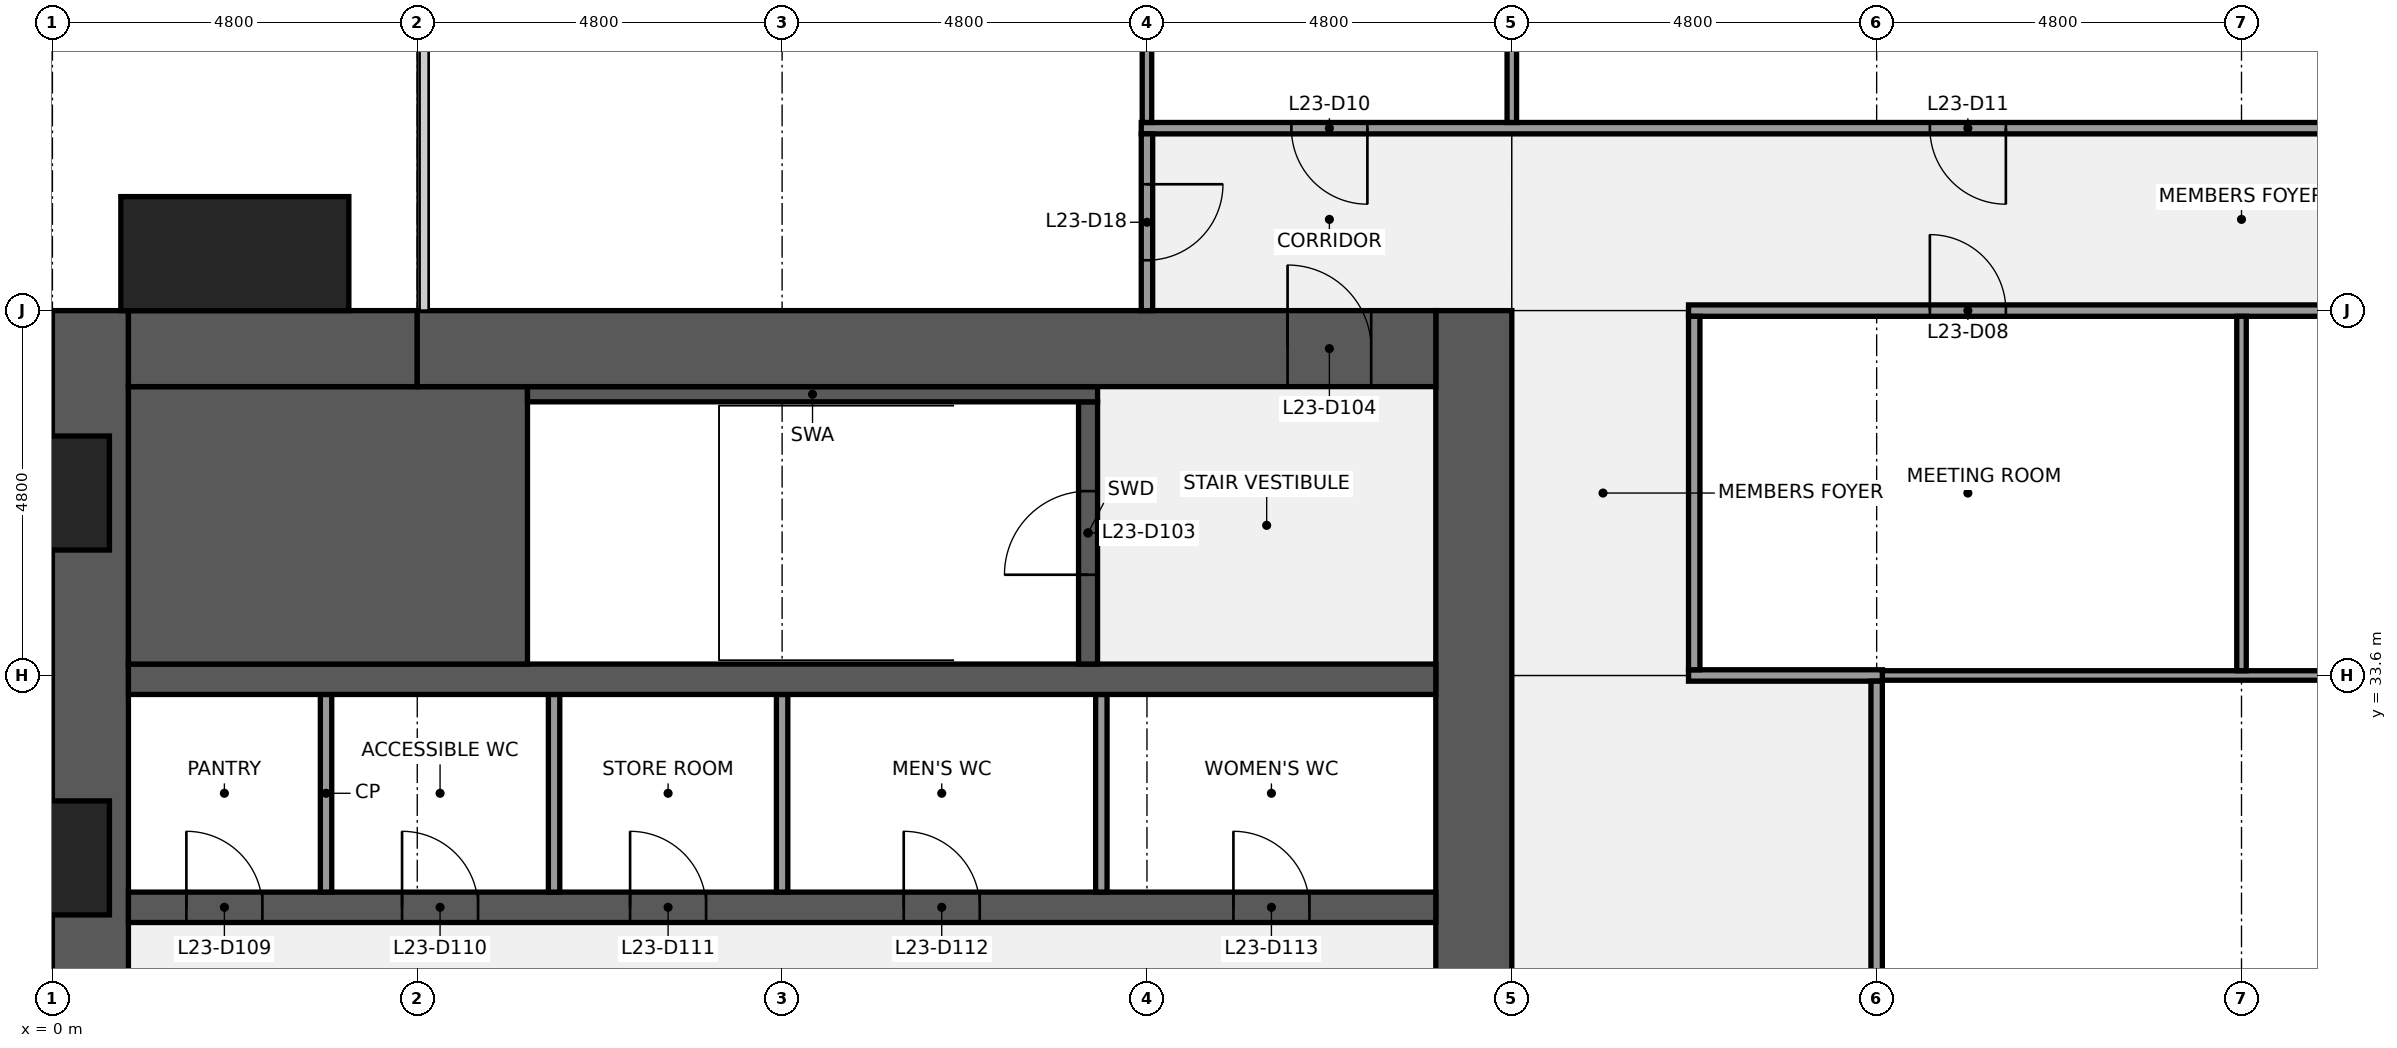
"""IFC4 building model, lengths in metres.
Left out: names, types, materials, properties, quantities, classifications, styles, units other than length and angle.
Written with IfcOpenShell. Run it as: python <this file> out.ifc"""

import sys

from ifc_helpers import new_model, si_unit, direction, frame, frame_2d, origin, origin_2d, place, context, subcontext, project, spatial, rectangle, extrude, element, fill, save


model = new_model("IFC4")
c1 = context("Model", 3, precision=1e-05, world=origin(), true_north=direction((0.0, 1.0)))
c2 = subcontext(c1, "Body", "Model", "MODEL_VIEW")
j1 = project(units=[si_unit("LENGTHUNIT", "METRE"), si_unit("PLANEANGLEUNIT", "RADIAN")], contexts=[c1])
p1 = place(None, origin())
s1 = spatial("IfcSite", under=j1, at=p1, CompositionType="ELEMENT")
p2 = place(p1, origin())
s2 = spatial("IfcBuilding", under=s1, at=p2, CompositionType="ELEMENT")
p3 = place(p2, frame((0.0, 0.0, 112.1)))
s3 = spatial("IfcBuildingStorey", under=s2, at=p3, CompositionType="ELEMENT", Elevation=112.1)
p4 = place(p3, frame((0.5, 9.6, 0.0), z_axis=(0.0, 0.0, 1.0), x_axis=(0.0, 1.0, 0.0)))
e1 = element("IfcWall", 1, at=p4, inside=s3, PredefinedType="SHEAR", context=c2, shape_type="SweptSolid", body=[
    extrude(rectangle(XDim=28.8, YDim=1.0, at=frame_2d((14.4, 0.0))), origin(), (0.0, 0.0, 1.0), 3.84),
])
p5 = place(p4, frame((8.85, 0.0, 0.9)))
e2 = element("IfcOpeningElement", 2, at=p5, cuts=e1, PredefinedType="OPENING", context=c2, shape_type="SweptSolid", body=[
    extrude(rectangle(XDim=1.5, YDim=1.5, at=frame_2d((0.75, 0.75))), frame((0.0, 0.51, 0.0), z_axis=(0.0, -1.0, 0.0), x_axis=(1.0, 0.0, 0.0)), (0.0, 0.0, 1.0), 1.02),
])
p6 = place(p4, frame((18.45, 0.0, 0.9)))
e3 = element("IfcOpeningElement", 3, at=p6, cuts=e1, PredefinedType="OPENING", context=c2, shape_type="SweptSolid", body=[
    extrude(rectangle(XDim=1.5, YDim=1.5, at=frame_2d((0.75, 0.75))), frame((0.0, 0.51, 0.0), z_axis=(0.0, -1.0, 0.0), x_axis=(1.0, 0.0, 0.0)), (0.0, 0.0, 1.0), 1.02),
])
p7 = place(p3, frame((18.7, 38.4, 0.0), z_axis=(0.0, 0.0, 1.0), x_axis=(0.0, -1.0, 0.0)))
e4 = element("IfcWall", 4, at=p7, inside=s3, PredefinedType="SHEAR", context=c2, shape_type="SweptSolid", body=[
    extrude(rectangle(XDim=28.8, YDim=1.0, at=frame_2d((14.4, 0.0))), origin(), (0.0, 0.0, 1.0), 3.84),
])
p8 = place(p7, frame((18.3, 0.0, 0.0)))
e5 = element("IfcOpeningElement", 5, at=p8, cuts=e4, PredefinedType="OPENING", context=c2, shape_type="SweptSolid", body=[
    extrude(rectangle(XDim=1.8, YDim=2.1, at=frame_2d((0.9, 1.05))), frame((0.0, 0.51, 0.0), z_axis=(0.0, -1.0, 0.0), x_axis=(1.0, 0.0, 0.0)), (0.0, 0.0, 1.0), 1.02),
])
p9 = place(p7, frame((8.7, 0.0, 0.0)))
e6 = element("IfcOpeningElement", 6, at=p9, cuts=e4, PredefinedType="OPENING", context=c2, shape_type="SweptSolid", body=[
    extrude(rectangle(XDim=1.8, YDim=2.1, at=frame_2d((0.9, 1.05))), frame((0.0, 0.51, 0.0), z_axis=(0.0, -1.0, 0.0), x_axis=(1.0, 0.0, 0.0)), (0.0, 0.0, 1.0), 1.02),
])
p10 = place(p3, frame((1.0, 30.55, 0.0), z_axis=(0.0, 0.0, 1.0), x_axis=(1.0, 0.0, 0.0)))
e7 = element("IfcWall", 7, at=p10, inside=s3, PredefinedType="SHEAR", context=c2, shape_type="SweptSolid", body=[
    extrude(rectangle(XDim=17.2, YDim=0.4, at=frame_2d((8.6, 0.0))), origin(), (0.0, 0.0, 1.0), 3.84),
])
p11 = place(p10, frame((0.762, 0.0, 0.0)))
e8 = element("IfcOpeningElement", 8, at=p11, cuts=e7, PredefinedType="OPENING", context=c2, shape_type="SweptSolid", body=[
    extrude(rectangle(XDim=1.0, YDim=2.1, at=frame_2d((0.5, 1.05))), frame((0.0, 0.21, 0.0), z_axis=(0.0, -1.0, 0.0), x_axis=(1.0, 0.0, 0.0)), (0.0, 0.0, 1.0), 0.42),
])
p12 = place(p10, frame((3.6, 0.0, 0.0)))
e9 = element("IfcOpeningElement", 9, at=p12, cuts=e7, PredefinedType="OPENING", context=c2, shape_type="SweptSolid", body=[
    extrude(rectangle(XDim=1.0, YDim=2.1, at=frame_2d((0.5, 1.05))), frame((0.0, 0.21, 0.0), z_axis=(0.0, -1.0, 0.0), x_axis=(1.0, 0.0, 0.0)), (0.0, 0.0, 1.0), 0.42),
])
p13 = place(p10, frame((6.6, 0.0, 0.0)))
e10 = element("IfcOpeningElement", 10, at=p13, cuts=e7, PredefinedType="OPENING", context=c2, shape_type="SweptSolid", body=[
    extrude(rectangle(XDim=1.0, YDim=2.1, at=frame_2d((0.5, 1.05))), frame((0.0, 0.21, 0.0), z_axis=(0.0, -1.0, 0.0), x_axis=(1.0, 0.0, 0.0)), (0.0, 0.0, 1.0), 0.42),
])
p14 = place(p10, frame((10.2, 0.0, 0.0)))
e11 = element("IfcOpeningElement", 11, at=p14, cuts=e7, PredefinedType="OPENING", context=c2, shape_type="SweptSolid", body=[
    extrude(rectangle(XDim=1.0, YDim=2.1, at=frame_2d((0.5, 1.05))), frame((0.0, 0.21, 0.0), z_axis=(0.0, -1.0, 0.0), x_axis=(1.0, 0.0, 0.0)), (0.0, 0.0, 1.0), 0.42),
])
p15 = place(p10, frame((14.538, 0.0, 0.0)))
e12 = element("IfcOpeningElement", 12, at=p15, cuts=e7, PredefinedType="OPENING", context=c2, shape_type="SweptSolid", body=[
    extrude(rectangle(XDim=1.0, YDim=2.1, at=frame_2d((0.5, 1.05))), frame((0.0, 0.21, 0.0), z_axis=(0.0, -1.0, 0.0), x_axis=(1.0, 0.0, 0.0)), (0.0, 0.0, 1.0), 0.42),
])
for number, where, z_axis, x_axis in (
    (13, (3.6, 30.75, 0.0), (0.0, 0.0, 1.0), (0.0, 1.0, 0.0)),
    (14, (6.6, 30.75, 0.0), (0.0, 0.0, 1.0), (0.0, 1.0, 0.0)),
    (15, (9.6, 30.75, 0.0), (0.0, 0.0, 1.0), (0.0, 1.0, 0.0)),
    (16, (13.8, 30.75, 0.0), (0.0, 0.0, 1.0), (0.0, 1.0, 0.0)),
):
    element("IfcWall", number, at=place(p3, frame(where, z_axis=z_axis, x_axis=x_axis)), inside=s3, PredefinedType="PARTITIONING", context=c2, shape_type="SweptSolid", body=[
        extrude(rectangle(XDim=2.6, YDim=0.15, at=frame_2d((1.3, 0.0))), origin(), (0.0, 0.0, 1.0), 3.84),
    ])
p16 = place(p3, frame((1.0, 33.55, 0.0), z_axis=(0.0, 0.0, 1.0), x_axis=(1.0, 0.0, 0.0)))
e17 = element("IfcWall", 17, at=p16, inside=s3, PredefinedType="SHEAR", context=c2, shape_type="SweptSolid", body=[
    extrude(rectangle(XDim=17.2, YDim=0.4, at=frame_2d((8.6, 0.0))), origin(), (0.0, 0.0, 1.0), 3.84),
])
p17 = place(p3, frame((1.0, 35.575, 0.0), z_axis=(0.0, 0.0, 1.0), x_axis=(1.0, 0.0, 0.0)))
e18 = element("IfcWall", 18, at=p17, inside=s3, PredefinedType="SHEAR", context=c2, shape_type="SweptSolid", body=[
    extrude(rectangle(XDim=5.25, YDim=3.65, at=frame_2d((2.625, 0.0))), origin(), (0.0, 0.0, 1.0), 3.84),
])
p18 = place(p3, frame((13.625, 33.75, 0.0), z_axis=(0.0, 0.0, 1.0), x_axis=(0.0, 1.0, 0.0)))
e19 = element("IfcWall", 19, at=p18, inside=s3, PredefinedType="SHEAR", context=c2, shape_type="SweptSolid", body=[
    extrude(rectangle(XDim=3.45, YDim=0.25, at=frame_2d((1.725, 0.0))), origin(), (0.0, 0.0, 1.0), 3.84),
])
p19 = place(p18, frame((1.175, 0.0, 0.0)))
e20 = element("IfcOpeningElement", 20, at=p19, cuts=e19, PredefinedType="OPENING", context=c2, shape_type="SweptSolid", body=[
    extrude(rectangle(XDim=1.1, YDim=2.1, at=frame_2d((0.55, 1.05))), frame((0.0, 0.135, 0.0), z_axis=(0.0, -1.0, 0.0), x_axis=(1.0, 0.0, 0.0)), (0.0, 0.0, 1.0), 0.27),
])
p20 = place(p3, frame((6.25, 37.3, 0.0), z_axis=(0.0, 0.0, 1.0), x_axis=(1.0, 0.0, 0.0)))
e21 = element("IfcWall", 21, at=p20, inside=s3, PredefinedType="SHEAR", context=c2, shape_type="SweptSolid", body=[
    extrude(rectangle(XDim=7.5, YDim=0.2, at=frame_2d((3.75, 0.0))), origin(), (0.0, 0.0, 1.0), 3.84),
])
p21 = place(p3, frame((1.0, 37.9, 0.0), z_axis=(0.0, 0.0, 1.0), x_axis=(1.0, 0.0, 0.0)))
e22 = element("IfcWall", 22, at=p21, inside=s3, PredefinedType="SHEAR", context=c2, shape_type="SweptSolid", body=[
    extrude(rectangle(XDim=3.8, YDim=1.0, at=frame_2d((1.9, 0.0))), origin(), (0.0, 0.0, 1.0), 3.84),
])
p22 = place(p3, frame((4.8, 37.9, 0.0), z_axis=(0.0, 0.0, 1.0), x_axis=(1.0, 0.0, 0.0)))
e23 = element("IfcWall", 23, at=p22, inside=s3, PredefinedType="SHEAR", context=c2, shape_type="SweptSolid", body=[
    extrude(rectangle(XDim=13.4, YDim=1.0, at=frame_2d((6.7, 0.0))), origin(), (0.0, 0.0, 1.0), 3.84),
])
p23 = place(p22, frame((11.45, 0.0, 0.0)))
e24 = element("IfcOpeningElement", 24, at=p23, cuts=e23, PredefinedType="OPENING", context=c2, shape_type="SweptSolid", body=[
    extrude(rectangle(XDim=1.1, YDim=2.1, at=frame_2d((0.55, 1.05))), frame((0.0, 0.51, 0.0), z_axis=(0.0, -1.0, 0.0), x_axis=(1.0, 0.0, 0.0)), (0.0, 0.0, 1.0), 1.02),
])
p24 = place(p3, frame((24.075, 33.6, 0.0), z_axis=(0.0, 0.0, 1.0), x_axis=(1.0, 0.0, 0.0)))
e25 = element("IfcWall", 25, at=p24, inside=s3, PredefinedType="PARTITIONING", context=c2, shape_type="SweptSolid", body=[
    extrude(rectangle(XDim=9.6, YDim=0.125, at=frame_2d((4.8, 0.0))), origin(), (0.0, 0.0, 1.0), 2.849),
])
p25 = place(p3, frame((21.525, 33.6, 0.0), z_axis=(0.0, 0.0, 1.0), x_axis=(1.0, 0.0, 0.0)))
e26 = element("IfcWall", 26, at=p25, inside=s3, PredefinedType="PARTITIONING", context=c2, shape_type="SweptSolid", body=[
    extrude(rectangle(XDim=2.55, YDim=0.15, at=frame_2d((1.275, 0.0))), origin(), (0.0, 0.0, 1.0), 2.849),
])
p26 = place(p3, frame((21.525, 38.4, 0.0), z_axis=(0.0, 0.0, 1.0), x_axis=(1.0, 0.0, 0.0)))
e27 = element("IfcWall", 27, at=p26, inside=s3, PredefinedType="PARTITIONING", context=c2, shape_type="SweptSolid", body=[
    extrude(rectangle(XDim=14.55, YDim=0.15, at=frame_2d((7.275, 0.0))), origin(), (0.0, 0.0, 1.0), 2.849),
])
p27 = place(p26, frame((3.175, 0.0, 0.0)))
e28 = element("IfcOpeningElement", 28, at=p27, cuts=e27, PredefinedType="OPENING", context=c2, shape_type="SweptSolid", body=[
    extrude(rectangle(XDim=1.0, YDim=2.1, at=frame_2d((0.5, 1.05))), frame((0.0, 0.085, 0.0), z_axis=(0.0, -1.0, 0.0), x_axis=(1.0, 0.0, 0.0)), (0.0, 0.0, 1.0), 0.17),
])
p28 = place(p26, frame((10.375, 0.0, 0.0)))
e29 = element("IfcOpeningElement", 29, at=p28, cuts=e27, PredefinedType="OPENING", context=c2, shape_type="SweptSolid", body=[
    extrude(rectangle(XDim=1.0, YDim=2.1, at=frame_2d((0.5, 1.05))), frame((0.0, 0.085, 0.0), z_axis=(0.0, -1.0, 0.0), x_axis=(1.0, 0.0, 0.0)), (0.0, 0.0, 1.0), 0.17),
])
p29 = place(p3, frame((14.325, 40.8, 0.0), z_axis=(0.0, 0.0, 1.0), x_axis=(1.0, 0.0, 0.0)))
e30 = element("IfcWall", 30, at=p29, inside=s3, PredefinedType="PARTITIONING", context=c2, shape_type="SweptSolid", body=[
    extrude(rectangle(XDim=28.95, YDim=0.15, at=frame_2d((14.475, 0.0))), origin(), (0.0, 0.0, 1.0), 2.849),
])
p30 = place(p29, frame((1.975, 0.0, 0.0)))
e31 = element("IfcOpeningElement", 31, at=p30, cuts=e30, PredefinedType="OPENING", context=c2, shape_type="SweptSolid", body=[
    extrude(rectangle(XDim=1.0, YDim=2.1, at=frame_2d((0.5, 1.05))), frame((0.0, 0.085, 0.0), z_axis=(0.0, -1.0, 0.0), x_axis=(1.0, 0.0, 0.0)), (0.0, 0.0, 1.0), 0.17),
])
p31 = place(p29, frame((10.375, 0.0, 0.0)))
e32 = element("IfcOpeningElement", 32, at=p31, cuts=e30, PredefinedType="OPENING", context=c2, shape_type="SweptSolid", body=[
    extrude(rectangle(XDim=1.0, YDim=2.1, at=frame_2d((0.5, 1.05))), frame((0.0, 0.085, 0.0), z_axis=(0.0, -1.0, 0.0), x_axis=(1.0, 0.0, 0.0)), (0.0, 0.0, 1.0), 0.17),
])
p32 = place(p29, frame((19.975, 0.0, 0.0)))
e33 = element("IfcOpeningElement", 33, at=p32, cuts=e30, PredefinedType="OPENING", context=c2, shape_type="SweptSolid", body=[
    extrude(rectangle(XDim=1.0, YDim=2.1, at=frame_2d((0.5, 1.05))), frame((0.0, 0.085, 0.0), z_axis=(0.0, -1.0, 0.0), x_axis=(1.0, 0.0, 0.0)), (0.0, 0.0, 1.0), 0.17),
])
p33 = place(p29, frame((25.975, 0.0, 0.0)))
e34 = element("IfcOpeningElement", 34, at=p33, cuts=e30, PredefinedType="OPENING", context=c2, shape_type="SweptSolid", body=[
    extrude(rectangle(XDim=1.0, YDim=2.1, at=frame_2d((0.5, 1.05))), frame((0.0, 0.085, 0.0), z_axis=(0.0, -1.0, 0.0), x_axis=(1.0, 0.0, 0.0)), (0.0, 0.0, 1.0), 0.17),
])
p34 = place(p3, frame((14.4, 40.875, 0.0), z_axis=(0.0, 0.0, 1.0), x_axis=(0.0, 1.0, 0.0)))
e35 = element("IfcWall", 35, at=p34, inside=s3, PredefinedType="PARTITIONING", context=c2, shape_type="SweptSolid", body=[
    extrude(rectangle(XDim=6.525, YDim=0.125, at=frame_2d((3.262, 0.0))), origin(), (0.0, 0.0, 1.0), 2.849),
])
p35 = place(p3, frame((14.4, 38.4, 0.0), z_axis=(0.0, 0.0, 1.0), x_axis=(0.0, 1.0, 0.0)))
e36 = element("IfcWall", 36, at=p35, inside=s3, PredefinedType="PARTITIONING", context=c2, shape_type="SweptSolid", body=[
    extrude(rectangle(XDim=2.325, YDim=0.15, at=frame_2d((1.163, 0.0))), origin(), (0.0, 0.0, 1.0), 2.849),
])
p36 = place(p35, frame((0.663, 0.0, 0.0)))
e37 = element("IfcOpeningElement", 37, at=p36, cuts=e36, PredefinedType="OPENING", context=c2, shape_type="SweptSolid", body=[
    extrude(rectangle(XDim=1.0, YDim=2.1, at=frame_2d((0.5, 1.05))), frame((0.0, 0.085, 0.0), z_axis=(0.0, -1.0, 0.0), x_axis=(1.0, 0.0, 0.0)), (0.0, 0.0, 1.0), 0.17),
])
p37 = place(p3, frame((19.2, 40.875, 0.0), z_axis=(0.0, 0.0, 1.0), x_axis=(0.0, 1.0, 0.0)))
e38 = element("IfcWall", 38, at=p37, inside=s3, PredefinedType="PARTITIONING", context=c2, shape_type="SweptSolid", body=[
    extrude(rectangle(XDim=6.525, YDim=0.125, at=frame_2d((3.262, 0.0))), origin(), (0.0, 0.0, 1.0), 2.849),
])
p38 = place(p3, frame((21.6, 33.675, 0.0), z_axis=(0.0, 0.0, 1.0), x_axis=(0.0, 1.0, 0.0)))
e39 = element("IfcWall", 39, at=p38, inside=s3, PredefinedType="PARTITIONING", context=c2, shape_type="SweptSolid", body=[
    extrude(rectangle(XDim=4.65, YDim=0.15, at=frame_2d((2.325, 0.0))), origin(), (0.0, 0.0, 1.0), 2.849),
])
p39 = place(p3, frame((24.0, 20.475, 0.0), z_axis=(0.0, 0.0, 1.0), x_axis=(0.0, 1.0, 0.0)))
e40 = element("IfcWall", 40, at=p39, inside=s3, PredefinedType="PARTITIONING", context=c2, shape_type="SweptSolid", body=[
    extrude(rectangle(XDim=13.05, YDim=0.15, at=frame_2d((6.525, 0.0))), origin(), (0.0, 0.0, 1.0), 2.849),
])
p40 = place(p39, frame((6.025, 0.0, 0.0)))
e41 = element("IfcOpeningElement", 41, at=p40, cuts=e40, PredefinedType="OPENING", context=c2, shape_type="SweptSolid", body=[
    extrude(rectangle(XDim=1.0, YDim=2.1, at=frame_2d((0.5, 1.05))), frame((0.0, 0.085, 0.0), z_axis=(0.0, -1.0, 0.0), x_axis=(1.0, 0.0, 0.0)), (0.0, 0.0, 1.0), 0.17),
])
p41 = place(p3, frame((28.8, 33.663, 0.0), z_axis=(0.0, 0.0, 1.0), x_axis=(0.0, 1.0, 0.0)))
e42 = element("IfcWall", 42, at=p41, inside=s3, PredefinedType="PARTITIONING", context=c2, shape_type="SweptSolid", body=[
    extrude(rectangle(XDim=4.662, YDim=0.125, at=frame_2d((2.331, 0.0))), origin(), (0.0, 0.0, 1.0), 2.849),
])
p42 = place(p3, frame((2.4, 39.15, 0.0), z_axis=(0.0, 0.0, 1.0), x_axis=(1.0, 0.0, 0.0)))
e43 = element("IfcColumn", 43, at=p42, inside=s3, PredefinedType="PILASTER", context=c2, shape_type="SweptSolid", body=[
    extrude(rectangle(XDim=3.0, YDim=1.5, at=origin_2d()), origin(), (0.0, 0.0, 1.0), 4.0),
])
p43 = place(p19, origin())
e44 = element("IfcDoor", 44, at=p43, inside=s3, OperationType="SINGLE_SWING_LEFT", PredefinedType="DOOR", context=c2, shape_type="SweptSolid", body=[
    extrude(rectangle(XDim=1.1, YDim=2.1, at=frame_2d((0.55, 1.05))), frame((0.0, 0.025, 0.0), z_axis=(0.0, -1.0, 0.0), x_axis=(1.0, 0.0, 0.0)), (0.0, 0.0, 1.0), 0.05),
])
fill(e20, e44)
p44 = place(p23, origin())
e45 = element("IfcDoor", 45, at=p44, inside=s3, OperationType="SINGLE_SWING_LEFT", PredefinedType="DOOR", context=c2, shape_type="SweptSolid", body=[
    extrude(rectangle(XDim=1.1, YDim=2.1, at=frame_2d((0.55, 1.05))), frame((0.0, 0.025, 0.0), z_axis=(0.0, -1.0, 0.0), x_axis=(1.0, 0.0, 0.0)), (0.0, 0.0, 1.0), 0.05),
])
fill(e24, e45)
p45 = place(p11, origin())
e46 = element("IfcDoor", 46, at=p45, inside=s3, OperationType="SINGLE_SWING_LEFT", PredefinedType="DOOR", context=c2, shape_type="SweptSolid", body=[
    extrude(rectangle(XDim=1.0, YDim=2.1, at=frame_2d((0.5, 1.05))), frame((0.0, 0.025, 0.0), z_axis=(0.0, -1.0, 0.0), x_axis=(1.0, 0.0, 0.0)), (0.0, 0.0, 1.0), 0.05),
])
fill(e8, e46)
p46 = place(p12, origin())
e47 = element("IfcDoor", 47, at=p46, inside=s3, OperationType="SINGLE_SWING_LEFT", PredefinedType="DOOR", context=c2, shape_type="SweptSolid", body=[
    extrude(rectangle(XDim=1.0, YDim=2.1, at=frame_2d((0.5, 1.05))), frame((0.0, 0.025, 0.0), z_axis=(0.0, -1.0, 0.0), x_axis=(1.0, 0.0, 0.0)), (0.0, 0.0, 1.0), 0.05),
])
fill(e9, e47)
p47 = place(p13, origin())
e48 = element("IfcDoor", 48, at=p47, inside=s3, OperationType="SINGLE_SWING_LEFT", PredefinedType="DOOR", context=c2, shape_type="SweptSolid", body=[
    extrude(rectangle(XDim=1.0, YDim=2.1, at=frame_2d((0.5, 1.05))), frame((0.0, 0.025, 0.0), z_axis=(0.0, -1.0, 0.0), x_axis=(1.0, 0.0, 0.0)), (0.0, 0.0, 1.0), 0.05),
])
fill(e10, e48)
p48 = place(p14, origin())
e49 = element("IfcDoor", 49, at=p48, inside=s3, OperationType="SINGLE_SWING_LEFT", PredefinedType="DOOR", context=c2, shape_type="SweptSolid", body=[
    extrude(rectangle(XDim=1.0, YDim=2.1, at=frame_2d((0.5, 1.05))), frame((0.0, 0.025, 0.0), z_axis=(0.0, -1.0, 0.0), x_axis=(1.0, 0.0, 0.0)), (0.0, 0.0, 1.0), 0.05),
])
fill(e11, e49)
p49 = place(p15, origin())
e50 = element("IfcDoor", 50, at=p49, inside=s3, OperationType="SINGLE_SWING_LEFT", PredefinedType="DOOR", context=c2, shape_type="SweptSolid", body=[
    extrude(rectangle(XDim=1.0, YDim=2.1, at=frame_2d((0.5, 1.05))), frame((0.0, 0.025, 0.0), z_axis=(0.0, -1.0, 0.0), x_axis=(1.0, 0.0, 0.0)), (0.0, 0.0, 1.0), 0.05),
])
fill(e12, e50)
p50 = place(p27, origin())
e51 = element("IfcDoor", 51, at=p50, inside=s3, OperationType="SINGLE_SWING_LEFT", PredefinedType="DOOR", context=c2, shape_type="SweptSolid", body=[
    extrude(rectangle(XDim=1.0, YDim=2.1, at=frame_2d((0.5, 1.05))), frame((0.0, 0.025, 0.0), z_axis=(0.0, -1.0, 0.0), x_axis=(1.0, 0.0, 0.0)), (0.0, 0.0, 1.0), 0.05),
])
fill(e28, e51)
p51 = place(p30, origin())
e52 = element("IfcDoor", 52, at=p51, inside=s3, OperationType="SINGLE_SWING_RIGHT", PredefinedType="DOOR", context=c2, shape_type="SweptSolid", body=[
    extrude(rectangle(XDim=1.0, YDim=2.1, at=frame_2d((0.5, 1.05))), frame((0.0, 0.025, 0.0), z_axis=(0.0, -1.0, 0.0), x_axis=(1.0, 0.0, 0.0)), (0.0, 0.0, 1.0), 0.05),
])
fill(e31, e52)
p52 = place(p31, origin())
e53 = element("IfcDoor", 53, at=p52, inside=s3, OperationType="SINGLE_SWING_RIGHT", PredefinedType="DOOR", context=c2, shape_type="SweptSolid", body=[
    extrude(rectangle(XDim=1.0, YDim=2.1, at=frame_2d((0.5, 1.05))), frame((0.0, 0.025, 0.0), z_axis=(0.0, -1.0, 0.0), x_axis=(1.0, 0.0, 0.0)), (0.0, 0.0, 1.0), 0.05),
])
fill(e32, e53)
p53 = place(p36, origin())
e54 = element("IfcDoor", 54, at=p53, inside=s3, OperationType="SINGLE_SWING_RIGHT", PredefinedType="DOOR", context=c2, shape_type="SweptSolid", body=[
    extrude(rectangle(XDim=1.0, YDim=2.1, at=frame_2d((0.5, 1.05))), frame((0.0, 0.025, 0.0), z_axis=(0.0, -1.0, 0.0), x_axis=(1.0, 0.0, 0.0)), (0.0, 0.0, 1.0), 0.05),
])
fill(e37, e54)
save(model, sys.argv[1])
